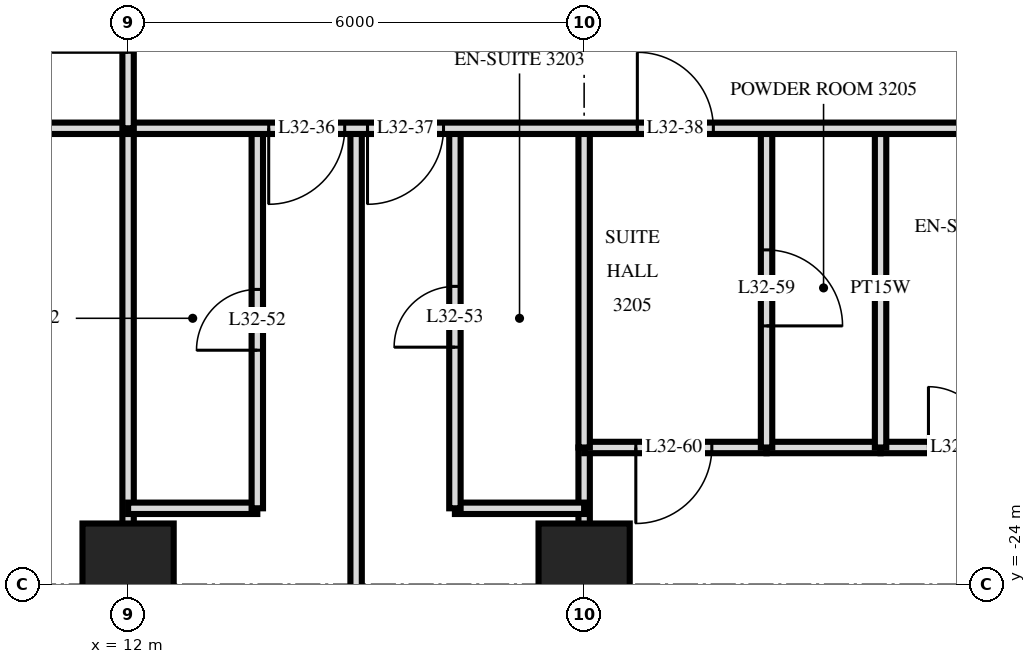
"""IFC4 building model, lengths in metres.
Left out: names, types, materials, properties, quantities, classifications, styles, units other than length and angle.
Written with IfcOpenShell. Run it as: python <this file> out.ifc"""

import sys

from ifc_helpers import new_model, si_unit, direction, frame, frame_2d, origin, origin_2d, place, context, subcontext, project, spatial, rectangle, extrude, element, fill, save


model = new_model("IFC4")
c1 = context("Model", 3, precision=1e-05, world=origin(), true_north=direction((0.0, 1.0)))
c2 = subcontext(c1, "Body", "Model", "MODEL_VIEW")
j1 = project(units=[si_unit("LENGTHUNIT", "METRE"), si_unit("PLANEANGLEUNIT", "RADIAN")], contexts=[c1])
p1 = place(None, origin())
s1 = spatial("IfcSite", under=j1, at=p1, CompositionType="ELEMENT")
p2 = place(p1, origin())
s2 = spatial("IfcBuilding", under=s1, at=p2, CompositionType="ELEMENT")
p3 = place(p2, frame((0.0, 0.0, 127.2)))
s3 = spatial("IfcBuildingStorey", under=s2, at=p3, CompositionType="ELEMENT", Elevation=127.2)
for number, where, z_axis, x_axis in (
    (1, (12.0, -23.8, 0.0), (0.0, 0.0, 1.0), (1.0, 0.0, 0.0)),
    (2, (18.0, -23.8, 0.0), (0.0, 0.0, 1.0), (1.0, 0.0, 0.0)),
):
    element("IfcColumn", number, at=place(p3, frame(where, z_axis=z_axis, x_axis=x_axis)), inside=s3, PredefinedType="COLUMN", context=c2, shape_type="SweptSolid", body=[
        extrude(rectangle(XDim=1.2, YDim=1.2, at=origin_2d()), origin(), (0.0, 0.0, 1.0), 3.6),
    ])
p4 = place(p3, frame((21.9, -22.2, 0.0), z_axis=(0.0, 0.0, 1.0), x_axis=(0.0, 1.0, 0.0)))
e3 = element("IfcWall", 3, at=p4, inside=s3, PredefinedType="PLUMBINGWALL", context=c2, shape_type="SweptSolid", body=[
    extrude(rectangle(XDim=4.2, YDim=0.15, at=frame_2d((2.1, 0.0))), origin(), (0.0, 0.0, 1.0), 3.32),
])
p5 = place(p3, frame((20.4, -22.2, 0.0), z_axis=(0.0, 0.0, 1.0), x_axis=(0.0, 1.0, 0.0)))
e4 = element("IfcWall", 4, at=p5, inside=s3, PredefinedType="PARTITIONING", context=c2, shape_type="SweptSolid", body=[
    extrude(rectangle(XDim=4.2, YDim=0.15, at=frame_2d((2.1, 0.0))), origin(), (0.0, 0.0, 1.0), 3.32),
])
p6 = place(p5, frame((1.6, 0.0, 0.0)))
e5 = element("IfcOpeningElement", 5, at=p6, cuts=e4, PredefinedType="OPENING", context=c2, shape_type="SweptSolid", body=[
    extrude(rectangle(XDim=1.0, YDim=2.1, at=frame_2d((0.5, 1.05))), frame((0.0, 0.085, 0.0), z_axis=(0.0, -1.0, 0.0), x_axis=(1.0, 0.0, 0.0)), (0.0, 0.0, 1.0), 0.17),
])
p7 = place(p3, frame((18.0, -22.2, 0.0), z_axis=(0.0, 0.0, 1.0), x_axis=(0.0, 1.0, 0.0)))
e6 = element("IfcWall", 6, at=p7, inside=s3, PredefinedType="PARTITIONING", context=c2, shape_type="SweptSolid", body=[
    extrude(rectangle(XDim=4.2, YDim=0.15, at=frame_2d((2.1, 0.0))), origin(), (0.0, 0.0, 1.0), 3.32),
])
p8 = place(p3, frame((18.0, -33.62, 0.0), z_axis=(0.0, 0.0, 1.0), x_axis=(0.0, 1.0, 0.0)))
e7 = element("IfcWall", 7, at=p8, inside=s3, PredefinedType="PARTITIONING", context=c2, shape_type="SweptSolid", body=[
    extrude(rectangle(XDim=11.42, YDim=0.15, at=frame_2d((5.71, 0.0))), origin(), (0.0, 0.0, 1.0), 3.32),
])
p9 = place(p3, frame((16.3, -23.0, 0.0), z_axis=(0.0, 0.0, 1.0), x_axis=(0.0, 1.0, 0.0)))
e8 = element("IfcWall", 8, at=p9, inside=s3, PredefinedType="PARTITIONING", context=c2, shape_type="SweptSolid", body=[
    extrude(rectangle(XDim=5.0, YDim=0.15, at=frame_2d((2.5, 0.0))), origin(), (0.0, 0.0, 1.0), 3.32),
])
p10 = place(p9, frame((2.12, 0.0, 0.0)))
e9 = element("IfcOpeningElement", 9, at=p10, cuts=e8, PredefinedType="OPENING", context=c2, shape_type="SweptSolid", body=[
    extrude(rectangle(XDim=0.8, YDim=2.1, at=frame_2d((0.4, 1.05))), frame((0.0, 0.085, 0.0), z_axis=(0.0, -1.0, 0.0), x_axis=(1.0, 0.0, 0.0)), (0.0, 0.0, 1.0), 0.17),
])
p11 = place(p3, frame((15.0, -33.62, 0.0), z_axis=(0.0, 0.0, 1.0), x_axis=(0.0, 1.0, 0.0)))
e10 = element("IfcWall", 10, at=p11, inside=s3, PredefinedType="PARTITIONING", context=c2, shape_type="SweptSolid", body=[
    extrude(rectangle(XDim=15.62, YDim=0.15, at=frame_2d((7.81, 0.0))), origin(), (0.0, 0.0, 1.0), 3.32),
])
p12 = place(p3, frame((13.7, -23.0, 0.0), z_axis=(0.0, 0.0, 1.0), x_axis=(0.0, 1.0, 0.0)))
e11 = element("IfcWall", 11, at=p12, inside=s3, PredefinedType="PARTITIONING", context=c2, shape_type="SweptSolid", body=[
    extrude(rectangle(XDim=5.0, YDim=0.15, at=frame_2d((2.5, 0.0))), origin(), (0.0, 0.0, 1.0), 3.32),
])
p13 = place(p12, frame((2.08, 0.0, 0.0)))
e12 = element("IfcOpeningElement", 12, at=p13, cuts=e11, PredefinedType="OPENING", context=c2, shape_type="SweptSolid", body=[
    extrude(rectangle(XDim=0.8, YDim=2.1, at=frame_2d((0.4, 1.05))), frame((0.0, 0.085, 0.0), z_axis=(0.0, -1.0, 0.0), x_axis=(1.0, 0.0, 0.0)), (0.0, 0.0, 1.0), 0.17),
])
p14 = place(p3, frame((12.0, -18.0, 0.0), z_axis=(0.0, 0.0, 1.0), x_axis=(0.0, 1.0, 0.0)))
e13 = element("IfcWall", 13, at=p14, inside=s3, PredefinedType="PARTITIONING", context=c2, shape_type="SweptSolid", body=[
    extrude(rectangle(XDim=2.95, YDim=0.15, at=frame_2d((1.475, 0.0))), origin(), (0.0, 0.0, 1.0), 3.32),
])
p15 = place(p14, frame((1.0, 0.0, 0.0)))
e14 = element("IfcOpeningElement", 14, at=p15, cuts=e13, PredefinedType="OPENING", context=c2, shape_type="SweptSolid", body=[
    extrude(rectangle(XDim=1.0, YDim=2.1, at=frame_2d((0.5, 1.05))), frame((0.0, 0.085, 0.0), z_axis=(0.0, -1.0, 0.0), x_axis=(1.0, 0.0, 0.0)), (0.0, 0.0, 1.0), 0.17),
])
p16 = place(p3, frame((12.0, -33.62, 0.0), z_axis=(0.0, 0.0, 1.0), x_axis=(0.0, 1.0, 0.0)))
e15 = element("IfcWall", 15, at=p16, inside=s3, PredefinedType="PARTITIONING", context=c2, shape_type="SweptSolid", body=[
    extrude(rectangle(XDim=15.62, YDim=0.15, at=frame_2d((7.81, 0.0))), origin(), (0.0, 0.0, 1.0), 3.32),
])
for number, where, z_axis, x_axis in (
    (16, (12.0, -23.0, 0.0), (0.0, 0.0, 1.0), (1.0, 0.0, 0.0)),
    (17, (16.3, -23.0, 0.0), (0.0, 0.0, 1.0), (1.0, 0.0, 0.0)),
):
    element("IfcWall", number, at=place(p3, frame(where, z_axis=z_axis, x_axis=x_axis)), inside=s3, PredefinedType="PARTITIONING", context=c2, shape_type="SweptSolid", body=[
        extrude(rectangle(XDim=1.7, YDim=0.15, at=frame_2d((0.85, 0.0))), origin(), (0.0, 0.0, 1.0), 3.32),
    ])
p17 = place(p3, frame((18.0, -22.2, 0.0), z_axis=(0.0, 0.0, 1.0), x_axis=(1.0, 0.0, 0.0)))
e18 = element("IfcWall", 18, at=p17, inside=s3, PredefinedType="PARTITIONING", context=c2, shape_type="SweptSolid", body=[
    extrude(rectangle(XDim=2.4, YDim=0.15, at=frame_2d((1.2, 0.0))), origin(), (0.0, 0.0, 1.0), 3.32),
])
p18 = place(p17, frame((0.68, 0.0, 0.0)))
e19 = element("IfcOpeningElement", 19, at=p18, cuts=e18, PredefinedType="OPENING", context=c2, shape_type="SweptSolid", body=[
    extrude(rectangle(XDim=1.0, YDim=2.1, at=frame_2d((0.5, 1.05))), frame((0.0, 0.085, 0.0), z_axis=(0.0, -1.0, 0.0), x_axis=(1.0, 0.0, 0.0)), (0.0, 0.0, 1.0), 0.17),
])
p19 = place(p3, frame((21.9, -22.2, 0.0), z_axis=(0.0, 0.0, 1.0), x_axis=(1.0, 0.0, 0.0)))
e20 = element("IfcWall", 20, at=p19, inside=s3, PredefinedType="PARTITIONING", context=c2, shape_type="SweptSolid", body=[
    extrude(rectangle(XDim=6.12, YDim=0.15, at=frame_2d((3.06, 0.0))), origin(), (0.0, 0.0, 1.0), 3.32),
])
p20 = place(p19, frame((0.63, 0.0, 0.0)))
e21 = element("IfcOpeningElement", 21, at=p20, cuts=e20, PredefinedType="OPENING", context=c2, shape_type="SweptSolid", body=[
    extrude(rectangle(XDim=0.8, YDim=2.1, at=frame_2d((0.4, 1.05))), frame((0.0, 0.085, 0.0), z_axis=(0.0, -1.0, 0.0), x_axis=(1.0, 0.0, 0.0)), (0.0, 0.0, 1.0), 0.17),
])
p21 = place(p19, frame((3.73, 0.0, 0.0)))
e22 = element("IfcOpeningElement", 22, at=p21, cuts=e20, PredefinedType="OPENING", context=c2, shape_type="SweptSolid", body=[
    extrude(rectangle(XDim=0.9, YDim=2.1, at=frame_2d((0.45, 1.05))), frame((0.0, 0.085, 0.0), z_axis=(0.0, -1.0, 0.0), x_axis=(1.0, 0.0, 0.0)), (0.0, 0.0, 1.0), 0.17),
])
p22 = place(p3, frame((20.4, -22.2, 0.0), z_axis=(0.0, 0.0, 1.0), x_axis=(1.0, 0.0, 0.0)))
e23 = element("IfcWall", 23, at=p22, inside=s3, PredefinedType="PLUMBINGWALL", context=c2, shape_type="SweptSolid", body=[
    extrude(rectangle(XDim=1.5, YDim=0.15, at=frame_2d((0.75, 0.0))), origin(), (0.0, 0.0, 1.0), 3.32),
])
p23 = place(p3, frame((-28.02, -18.0, 0.0), z_axis=(0.0, 0.0, 1.0), x_axis=(1.0, 0.0, 0.0)))
e24 = element("IfcWall", 24, at=p23, inside=s3, PredefinedType="PARTITIONING", context=c2, shape_type="SweptSolid", body=[
    extrude(rectangle(XDim=56.04, YDim=0.15, at=frame_2d((28.02, 0.0))), origin(), (0.0, 0.0, 1.0), 3.32),
])
p24 = place(p23, frame((13.17, 0.0, 0.0)))
e25 = element("IfcOpeningElement", 25, at=p24, cuts=e24, PredefinedType="OPENING", context=c2, shape_type="SweptSolid", body=[
    extrude(rectangle(XDim=1.0, YDim=2.1, at=frame_2d((0.5, 1.05))), frame((0.0, 0.085, 0.0), z_axis=(0.0, -1.0, 0.0), x_axis=(1.0, 0.0, 0.0)), (0.0, 0.0, 1.0), 0.17),
])
p25 = place(p23, frame((11.32, 0.0, 0.0)))
e26 = element("IfcOpeningElement", 26, at=p25, cuts=e24, PredefinedType="OPENING", context=c2, shape_type="SweptSolid", body=[
    extrude(rectangle(XDim=1.0, YDim=2.1, at=frame_2d((0.5, 1.05))), frame((0.0, 0.085, 0.0), z_axis=(0.0, -1.0, 0.0), x_axis=(1.0, 0.0, 0.0)), (0.0, 0.0, 1.0), 0.17),
])
p26 = place(p23, frame((41.87, 0.0, 0.0)))
e27 = element("IfcOpeningElement", 27, at=p26, cuts=e24, PredefinedType="OPENING", context=c2, shape_type="SweptSolid", body=[
    extrude(rectangle(XDim=1.0, YDim=2.1, at=frame_2d((0.5, 1.05))), frame((0.0, 0.085, 0.0), z_axis=(0.0, -1.0, 0.0), x_axis=(1.0, 0.0, 0.0)), (0.0, 0.0, 1.0), 0.17),
])
p27 = place(p23, frame((43.17, 0.0, 0.0)))
e28 = element("IfcOpeningElement", 28, at=p27, cuts=e24, PredefinedType="OPENING", context=c2, shape_type="SweptSolid", body=[
    extrude(rectangle(XDim=1.0, YDim=2.1, at=frame_2d((0.5, 1.05))), frame((0.0, 0.085, 0.0), z_axis=(0.0, -1.0, 0.0), x_axis=(1.0, 0.0, 0.0)), (0.0, 0.0, 1.0), 0.17),
])
p28 = place(p23, frame((46.72, 0.0, 0.0)))
e29 = element("IfcOpeningElement", 29, at=p28, cuts=e24, PredefinedType="OPENING", context=c2, shape_type="SweptSolid", body=[
    extrude(rectangle(XDim=1.0, YDim=2.1, at=frame_2d((0.5, 1.05))), frame((0.0, 0.085, 0.0), z_axis=(0.0, -1.0, 0.0), x_axis=(1.0, 0.0, 0.0)), (0.0, 0.0, 1.0), 0.17),
])
p29 = place(p23, frame((21.52, 0.0, 0.0)))
e30 = element("IfcOpeningElement", 30, at=p29, cuts=e24, PredefinedType="OPENING", context=c2, shape_type="SweptSolid", body=[
    extrude(rectangle(XDim=1.0, YDim=2.1, at=frame_2d((0.5, 1.05))), frame((0.0, 0.085, 0.0), z_axis=(0.0, -1.0, 0.0), x_axis=(1.0, 0.0, 0.0)), (0.0, 0.0, 1.0), 0.17),
])
p30 = place(p23, frame((33.52, 0.0, 0.0)))
e31 = element("IfcOpeningElement", 31, at=p30, cuts=e24, PredefinedType="OPENING", context=c2, shape_type="SweptSolid", body=[
    extrude(rectangle(XDim=1.0, YDim=2.1, at=frame_2d((0.5, 1.05))), frame((0.0, 0.085, 0.0), z_axis=(0.0, -1.0, 0.0), x_axis=(1.0, 0.0, 0.0)), (0.0, 0.0, 1.0), 0.17),
])
p31 = place(p26, frame((0.5, 0.0, 0.0), z_axis=(0.0, 0.0, 1.0), x_axis=(-1.0, 0.0, 0.0)))
e32 = element("IfcDoor", 32, at=p31, inside=s3, OperationType="SINGLE_SWING_LEFT", PredefinedType="DOOR", context=c2, shape_type="SweptSolid", body=[
    extrude(rectangle(XDim=1.0, YDim=2.1, at=frame_2d((0.0, 1.05))), frame((0.0, -0.025, 0.0), z_axis=(0.0, 1.0, 0.0), x_axis=(-1.0, 0.0, 0.0)), (0.0, 0.0, 1.0), 0.05),
])
fill(e27, e32)
p32 = place(p27, frame((0.5, 0.0, 0.0), z_axis=(0.0, 0.0, 1.0), x_axis=(-1.0, 0.0, 0.0)))
e33 = element("IfcDoor", 33, at=p32, inside=s3, OperationType="SINGLE_SWING_LEFT", PredefinedType="DOOR", context=c2, shape_type="SweptSolid", body=[
    extrude(rectangle(XDim=1.0, YDim=2.1, at=frame_2d((0.0, 1.05))), frame((0.0, -0.025, 0.0), z_axis=(0.0, 1.0, 0.0), x_axis=(-1.0, 0.0, 0.0)), (0.0, 0.0, 1.0), 0.05),
])
fill(e28, e33)
p33 = place(p28, origin())
e34 = element("IfcDoor", 34, at=p33, inside=s3, OperationType="SINGLE_SWING_RIGHT", PredefinedType="DOOR", context=c2, shape_type="SweptSolid", body=[
    extrude(rectangle(XDim=1.0, YDim=2.1, at=frame_2d((0.5, 1.05))), frame((0.0, 0.025, 0.0), z_axis=(0.0, -1.0, 0.0), x_axis=(1.0, 0.0, 0.0)), (0.0, 0.0, 1.0), 0.05),
])
fill(e29, e34)
p34 = place(p13, origin())
e35 = element("IfcDoor", 35, at=p34, inside=s3, OperationType="SINGLE_SWING_RIGHT", PredefinedType="DOOR", context=c2, shape_type="SweptSolid", body=[
    extrude(rectangle(XDim=0.8, YDim=2.1, at=frame_2d((0.4, 1.05))), frame((0.0, 0.025, 0.0), z_axis=(0.0, -1.0, 0.0), x_axis=(1.0, 0.0, 0.0)), (0.0, 0.0, 1.0), 0.05),
])
fill(e12, e35)
p35 = place(p10, origin())
e36 = element("IfcDoor", 36, at=p35, inside=s3, OperationType="SINGLE_SWING_RIGHT", PredefinedType="DOOR", context=c2, shape_type="SweptSolid", body=[
    extrude(rectangle(XDim=0.8, YDim=2.1, at=frame_2d((0.4, 1.05))), frame((0.0, 0.025, 0.0), z_axis=(0.0, -1.0, 0.0), x_axis=(1.0, 0.0, 0.0)), (0.0, 0.0, 1.0), 0.05),
])
fill(e9, e36)
p36 = place(p6, frame((0.5, 0.0, 0.0), z_axis=(0.0, 0.0, 1.0), x_axis=(-1.0, 0.0, 0.0)))
e37 = element("IfcDoor", 37, at=p36, inside=s3, OperationType="SINGLE_SWING_LEFT", PredefinedType="DOOR", context=c2, shape_type="SweptSolid", body=[
    extrude(rectangle(XDim=1.0, YDim=2.1, at=frame_2d((0.0, 1.05))), frame((0.0, -0.025, 0.0), z_axis=(0.0, 1.0, 0.0), x_axis=(-1.0, 0.0, 0.0)), (0.0, 0.0, 1.0), 0.05),
])
fill(e5, e37)
p37 = place(p18, frame((0.5, 0.0, 0.0), z_axis=(0.0, 0.0, 1.0), x_axis=(-1.0, 0.0, 0.0)))
e38 = element("IfcDoor", 38, at=p37, inside=s3, OperationType="SINGLE_SWING_LEFT", PredefinedType="DOOR", context=c2, shape_type="SweptSolid", body=[
    extrude(rectangle(XDim=1.0, YDim=2.1, at=frame_2d((0.0, 1.05))), frame((0.0, -0.025, 0.0), z_axis=(0.0, 1.0, 0.0), x_axis=(-1.0, 0.0, 0.0)), (0.0, 0.0, 1.0), 0.05),
])
fill(e19, e38)
p38 = place(p20, origin())
e39 = element("IfcDoor", 39, at=p38, inside=s3, OperationType="SINGLE_SWING_RIGHT", PredefinedType="DOOR", context=c2, shape_type="SweptSolid", body=[
    extrude(rectangle(XDim=0.8, YDim=2.1, at=frame_2d((0.4, 1.05))), frame((0.0, 0.025, 0.0), z_axis=(0.0, -1.0, 0.0), x_axis=(1.0, 0.0, 0.0)), (0.0, 0.0, 1.0), 0.05),
])
fill(e21, e39)
save(model, sys.argv[1])
